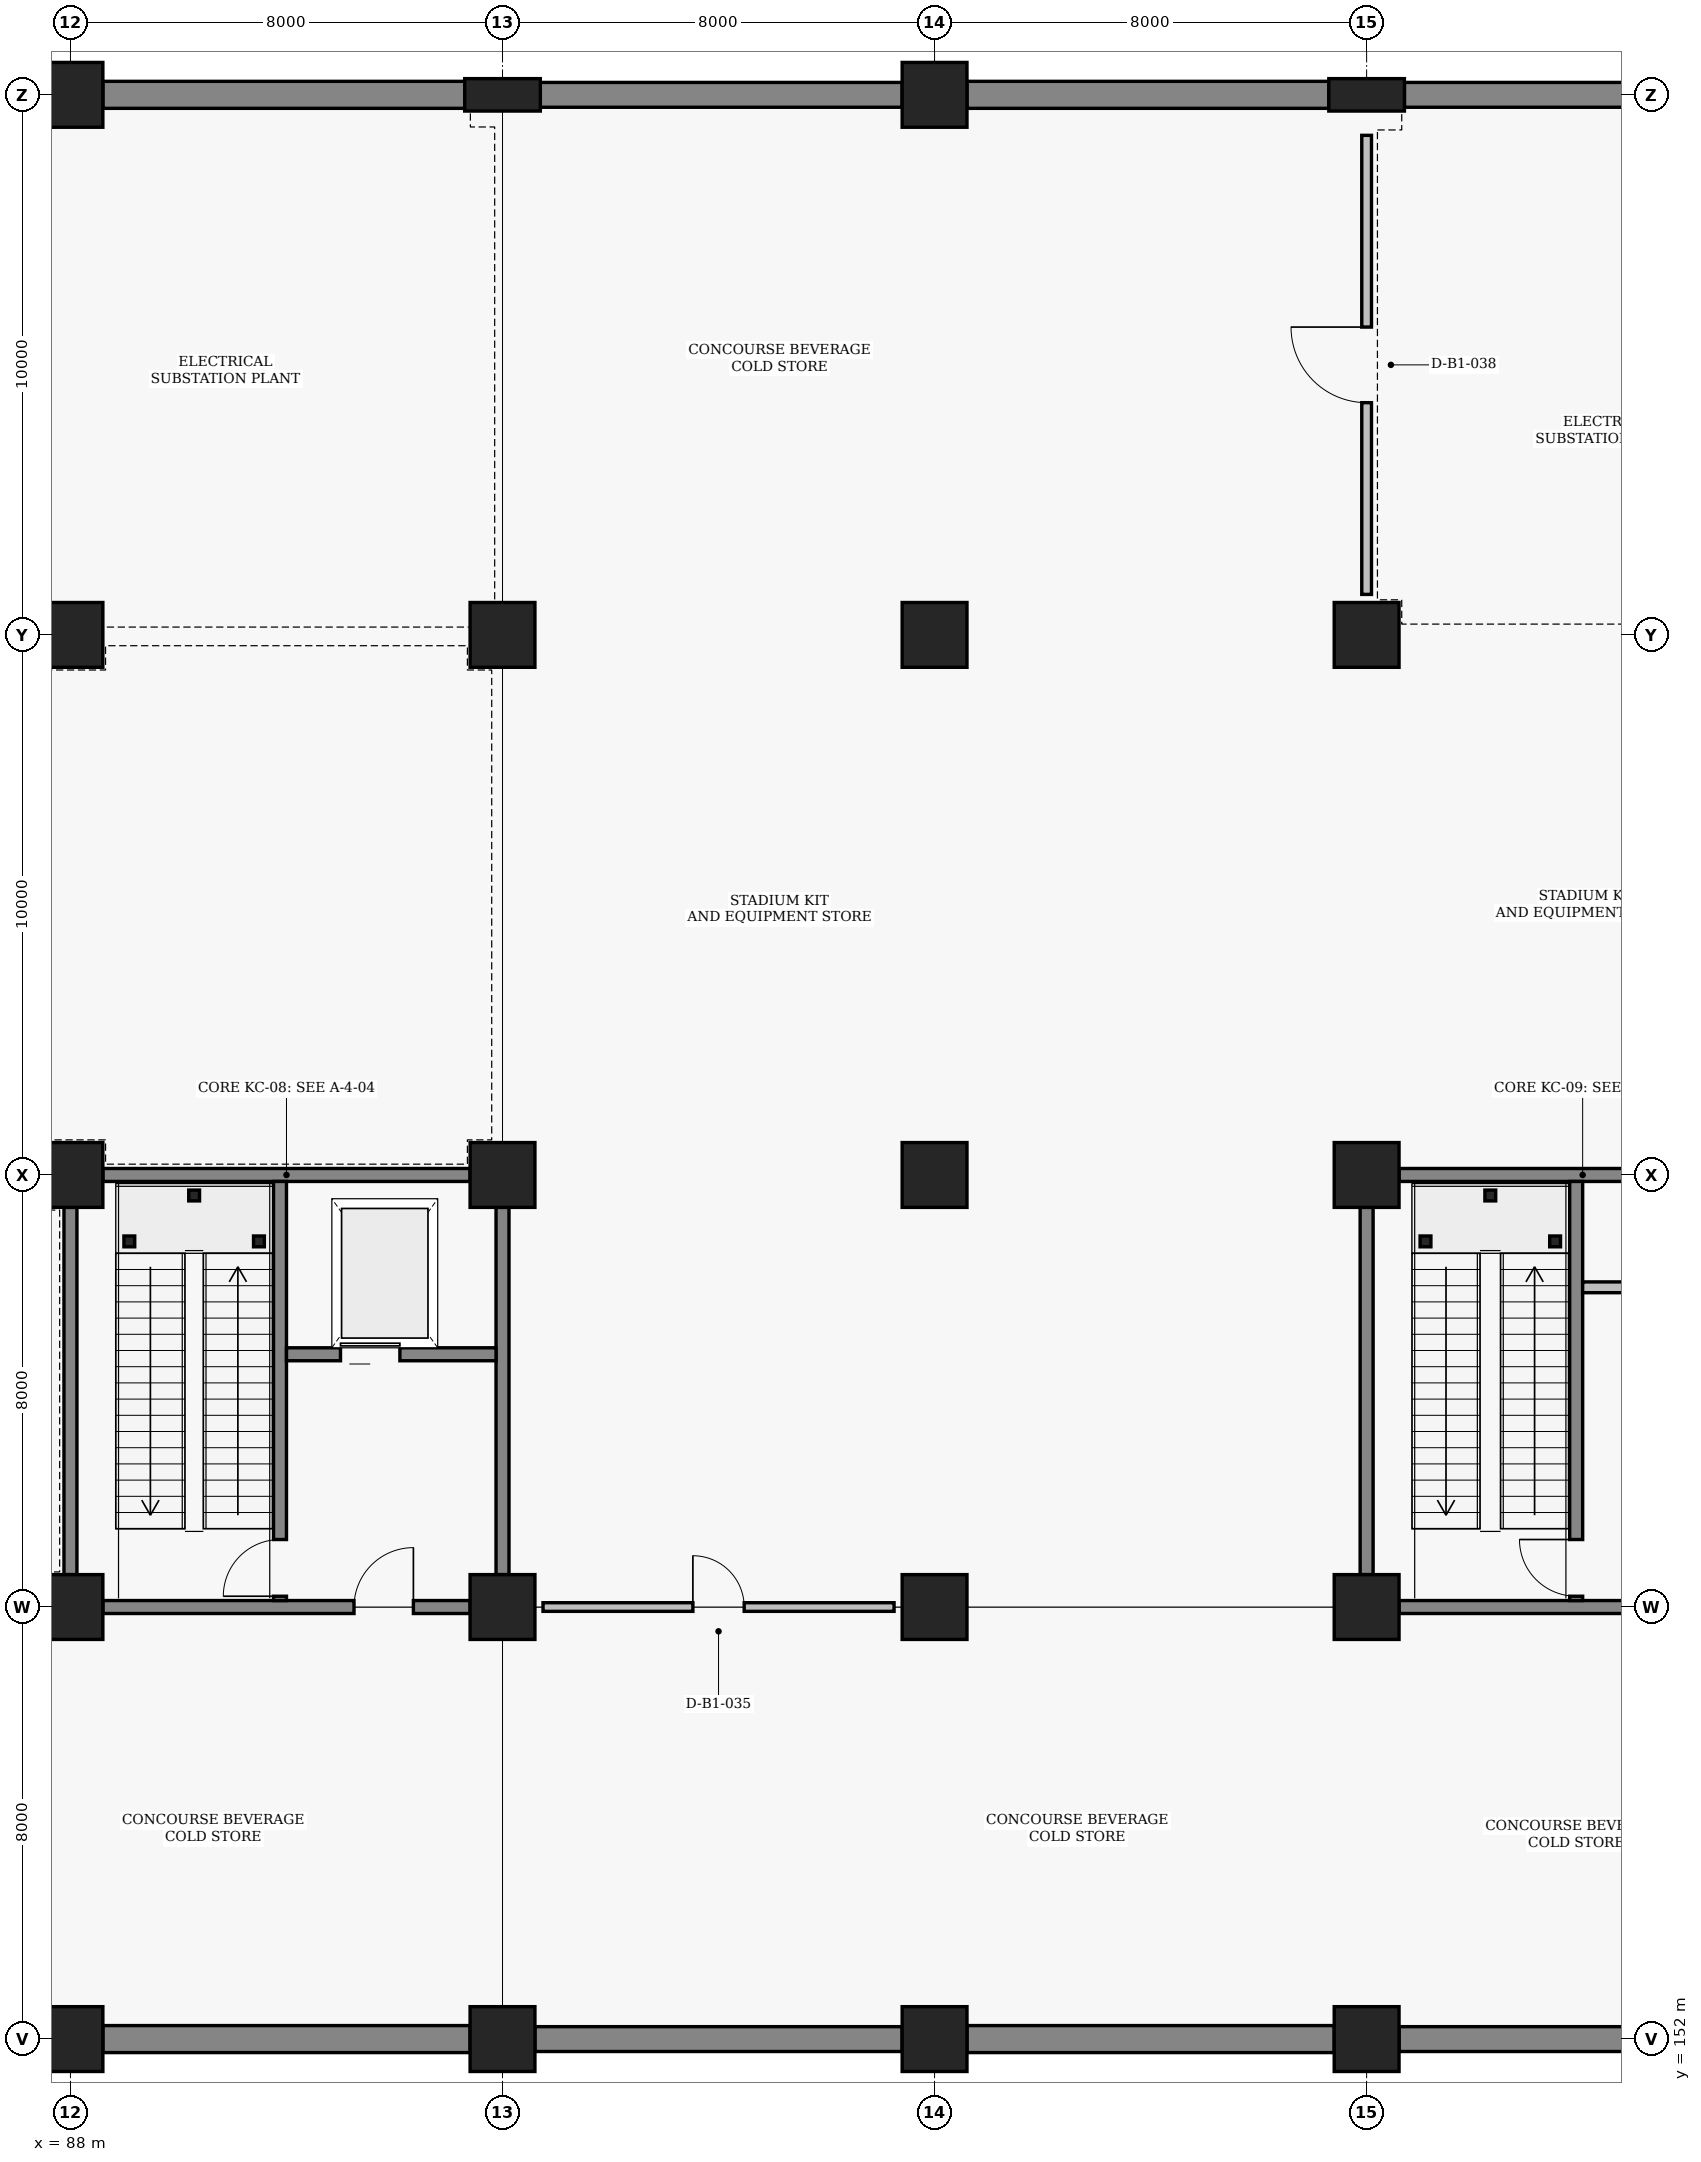
"""IFC4 building model, lengths in metres.
Left out: names, types, materials, properties, quantities, classifications, styles, units other than length and angle.
Written with IfcOpenShell. Run it as: python <this file> out.ifc"""

import sys

from ifc_helpers import new_model, si_unit, direction, frame, frame_2d, origin, origin_2d, place, context, subcontext, project, spatial, rectangle, hollow_rectangle, extrude, element, fill, save


model = new_model("IFC4")
c1 = context("Model", 3, precision=1e-05, world=origin(), true_north=direction((0.0, 1.0)))
c2 = subcontext(c1, "Body", "Model", "MODEL_VIEW")
j1 = project(units=[si_unit("LENGTHUNIT", "METRE"), si_unit("PLANEANGLEUNIT", "RADIAN")], contexts=[c1])
p1 = place(None, origin())
s1 = spatial("IfcSite", under=j1, at=p1, CompositionType="ELEMENT")
p2 = place(p1, origin())
s2 = spatial("IfcBuilding", under=s1, at=p2, CompositionType="ELEMENT")
p3 = place(p2, frame((0.0, 0.0, -5.4)))
s3 = spatial("IfcBuildingStorey", under=s2, at=p3, CompositionType="ELEMENT", Elevation=-5.4)
for number, where, z_axis, x_axis in (
    (1, (88.0, 152.0, 0.0), (0.0, 0.0, 1.0), (1.0, 0.0, 0.0)),
    (2, (88.0, 160.0, 0.0), (0.0, 0.0, 1.0), (1.0, 0.0, 0.0)),
    (3, (88.0, 168.0, 0.0), (0.0, 0.0, 1.0), (1.0, 0.0, 0.0)),
    (4, (88.0, 178.0, 0.0), (0.0, 0.0, 1.0), (1.0, 0.0, 0.0)),
    (5, (88.0, 188.0, 0.0), (0.0, 0.0, 1.0), (1.0, 0.0, 0.0)),
    (6, (96.0, 152.0, 0.0), (0.0, 0.0, 1.0), (1.0, 0.0, 0.0)),
    (7, (96.0, 160.0, 0.0), (0.0, 0.0, 1.0), (1.0, 0.0, 0.0)),
    (8, (96.0, 168.0, 0.0), (0.0, 0.0, 1.0), (1.0, 0.0, 0.0)),
    (9, (96.0, 178.0, 0.0), (0.0, 0.0, 1.0), (1.0, 0.0, 0.0)),
):
    element("IfcColumn", number, at=place(p3, frame(where, z_axis=z_axis, x_axis=x_axis)), inside=s3, PredefinedType="COLUMN", context=c2, shape_type="SweptSolid", body=[
        extrude(rectangle(XDim=1.2, YDim=1.2, at=origin_2d()), origin(), (0.0, 0.0, 1.0), 5.4),
    ])
p4 = place(p3, frame((96.0, 188.0, 0.0), z_axis=(0.0, 0.0, 1.0), x_axis=(0.0, 1.0, 0.0)))
e10 = element("IfcColumn", 10, at=p4, inside=s3, PredefinedType="PILASTER", context=c2, shape_type="SweptSolid", body=[
    extrude(rectangle(XDim=0.6, YDim=1.4, at=origin_2d()), origin(), (0.0, 0.0, 1.0), 5.4),
])
for number, where, z_axis, x_axis in (
    (11, (104.0, 152.0, 0.0), (0.0, 0.0, 1.0), (1.0, 0.0, 0.0)),
    (12, (104.0, 160.0, 0.0), (0.0, 0.0, 1.0), (1.0, 0.0, 0.0)),
    (13, (104.0, 168.0, 0.0), (0.0, 0.0, 1.0), (1.0, 0.0, 0.0)),
    (14, (104.0, 178.0, 0.0), (0.0, 0.0, 1.0), (1.0, 0.0, 0.0)),
    (15, (104.0, 188.0, 0.0), (0.0, 0.0, 1.0), (1.0, 0.0, 0.0)),
    (16, (112.0, 152.0, 0.0), (0.0, 0.0, 1.0), (1.0, 0.0, 0.0)),
    (17, (112.0, 160.0, 0.0), (0.0, 0.0, 1.0), (1.0, 0.0, 0.0)),
    (18, (112.0, 168.0, 0.0), (0.0, 0.0, 1.0), (1.0, 0.0, 0.0)),
    (19, (112.0, 178.0, 0.0), (0.0, 0.0, 1.0), (1.0, 0.0, 0.0)),
):
    element("IfcColumn", number, at=place(p3, frame(where, z_axis=z_axis, x_axis=x_axis)), inside=s3, PredefinedType="COLUMN", context=c2, shape_type="SweptSolid", body=[
        extrude(rectangle(XDim=1.2, YDim=1.2, at=origin_2d()), origin(), (0.0, 0.0, 1.0), 5.4),
    ])
p5 = place(p3, frame((112.0, 188.0, 0.0), z_axis=(0.0, 0.0, 1.0), x_axis=(0.0, 1.0, 0.0)))
e20 = element("IfcColumn", 20, at=p5, inside=s3, PredefinedType="PILASTER", context=c2, shape_type="SweptSolid", body=[
    extrude(rectangle(XDim=0.6, YDim=1.4, at=origin_2d()), origin(), (0.0, 0.0, 1.0), 5.4),
])
p6 = place(p3, frame((88.6, 152.0, 0.0), z_axis=(0.0, 0.0, 1.0), x_axis=(1.0, 0.0, 0.0)))
e21 = element("IfcWall", 21, at=p6, inside=s3, PredefinedType="STANDARD", context=c2, shape_type="SweptSolid", body=[
    extrude(rectangle(XDim=6.8, YDim=0.5, at=frame_2d((3.4, 0.0))), origin(), (0.0, 0.0, 1.0), 4.34),
])
p7 = place(p3, frame((88.6, 188.0, 0.0), z_axis=(0.0, 0.0, 1.0), x_axis=(1.0, 0.0, 0.0)))
e22 = element("IfcWall", 22, at=p7, inside=s3, PredefinedType="STANDARD", context=c2, shape_type="SweptSolid", body=[
    extrude(rectangle(XDim=6.7, YDim=0.5, at=frame_2d((3.35, 0.0))), origin(), (0.0, 0.0, 1.0), 4.34),
])
p8 = place(p3, frame((96.6, 152.0, 0.0), z_axis=(0.0, 0.0, 1.0), x_axis=(1.0, 0.0, 0.0)))
e23 = element("IfcWall", 23, at=p8, inside=s3, PredefinedType="STANDARD", context=c2, shape_type="SweptSolid", body=[
    extrude(rectangle(XDim=6.8, YDim=0.46, at=frame_2d((3.4, 0.0))), origin(), (0.0, 0.0, 1.0), 4.34),
])
p9 = place(p3, frame((96.7, 188.0, 0.0), z_axis=(0.0, 0.0, 1.0), x_axis=(1.0, 0.0, 0.0)))
e24 = element("IfcWall", 24, at=p9, inside=s3, PredefinedType="STANDARD", context=c2, shape_type="SweptSolid", body=[
    extrude(rectangle(XDim=6.7, YDim=0.46, at=frame_2d((3.35, 0.0))), origin(), (0.0, 0.0, 1.0), 4.34),
])
p10 = place(p3, frame((104.6, 152.0, 0.0), z_axis=(0.0, 0.0, 1.0), x_axis=(1.0, 0.0, 0.0)))
e25 = element("IfcWall", 25, at=p10, inside=s3, PredefinedType="STANDARD", context=c2, shape_type="SweptSolid", body=[
    extrude(rectangle(XDim=6.8, YDim=0.5, at=frame_2d((3.4, 0.0))), origin(), (0.0, 0.0, 1.0), 4.34),
])
p11 = place(p3, frame((104.6, 188.0, 0.0), z_axis=(0.0, 0.0, 1.0), x_axis=(1.0, 0.0, 0.0)))
e26 = element("IfcWall", 26, at=p11, inside=s3, PredefinedType="STANDARD", context=c2, shape_type="SweptSolid", body=[
    extrude(rectangle(XDim=6.7, YDim=0.5, at=frame_2d((3.35, 0.0))), origin(), (0.0, 0.0, 1.0), 4.34),
])
p12 = place(p3, frame((112.6, 152.0, 0.0), z_axis=(0.0, 0.0, 1.0), x_axis=(1.0, 0.0, 0.0)))
e27 = element("IfcWall", 27, at=p12, inside=s3, PredefinedType="STANDARD", context=c2, shape_type="SweptSolid", body=[
    extrude(rectangle(XDim=6.8, YDim=0.46, at=frame_2d((3.4, 0.0))), origin(), (0.0, 0.0, 1.0), 4.34),
])
p13 = place(p3, frame((112.7, 188.0, 0.0), z_axis=(0.0, 0.0, 1.0), x_axis=(1.0, 0.0, 0.0)))
e28 = element("IfcWall", 28, at=p13, inside=s3, PredefinedType="STANDARD", context=c2, shape_type="SweptSolid", body=[
    extrude(rectangle(XDim=6.7, YDim=0.46, at=frame_2d((3.35, 0.0))), origin(), (0.0, 0.0, 1.0), 4.34),
])
p14 = place(p3, frame((88.6, 160.0, 0.0), z_axis=(0.0, 0.0, 1.0), x_axis=(1.0, 0.0, 0.0)))
e29 = element("IfcWall", 29, at=p14, inside=s3, PredefinedType="SHEAR", context=c2, shape_type="SweptSolid", body=[
    extrude(rectangle(XDim=6.8, YDim=0.24, at=frame_2d((3.4, 0.0))), origin(), (0.0, 0.0, 1.0), 4.59),
])
p15 = place(p14, frame((4.65, 0.0, 0.0)))
e30 = element("IfcOpeningElement", 30, at=p15, cuts=e29, PredefinedType="OPENING", context=c2, shape_type="SweptSolid", body=[
    extrude(rectangle(XDim=1.1, YDim=2.2, at=frame_2d((0.55, 1.1))), frame((0.0, 0.13, 0.0), z_axis=(0.0, -1.0, 0.0), x_axis=(1.0, 0.0, 0.0)), (0.0, 0.0, 1.0), 0.26),
])
p16 = place(p3, frame((88.6, 168.0, 0.0), z_axis=(0.0, 0.0, 1.0), x_axis=(1.0, 0.0, 0.0)))
e31 = element("IfcWall", 31, at=p16, inside=s3, PredefinedType="SHEAR", context=c2, shape_type="SweptSolid", body=[
    extrude(rectangle(XDim=6.8, YDim=0.24, at=frame_2d((3.4, 0.0))), origin(), (0.0, 0.0, 1.0), 4.59),
])
for number, where, z_axis, x_axis in (
    (32, (88.0, 160.6, 0.0), (0.0, 0.0, 1.0), (0.0, 1.0, 0.0)),
    (33, (96.0, 160.6, 0.0), (0.0, 0.0, 1.0), (0.0, 1.0, 0.0)),
):
    element("IfcWall", number, at=place(p3, frame(where, z_axis=z_axis, x_axis=x_axis)), inside=s3, PredefinedType="SHEAR", context=c2, shape_type="SweptSolid", body=[
        extrude(rectangle(XDim=6.8, YDim=0.24, at=frame_2d((3.4, 0.0))), origin(), (0.0, 0.0, 1.0), 4.39),
    ])
p17 = place(p3, frame((91.88, 160.12, 0.0), z_axis=(0.0, 0.0, 1.0), x_axis=(0.0, 1.0, 0.0)))
e34 = element("IfcWall", 34, at=p17, inside=s3, PredefinedType="SHEAR", context=c2, shape_type="SweptSolid", body=[
    extrude(rectangle(XDim=7.76, YDim=0.24, at=frame_2d((3.88, 0.0))), origin(), (0.0, 0.0, 1.0), 4.59),
])
p18 = place(p17, frame((0.08, 0.0, 0.0)))
e35 = element("IfcOpeningElement", 35, at=p18, cuts=e34, PredefinedType="OPENING", context=c2, shape_type="SweptSolid", body=[
    extrude(rectangle(XDim=1.05, YDim=2.15, at=frame_2d((0.525, 1.075))), frame((0.0, 0.13, 0.0), z_axis=(0.0, -1.0, 0.0), x_axis=(1.0, 0.0, 0.0)), (0.0, 0.0, 1.0), 0.26),
])
p19 = place(p3, frame((92.0, 164.68, 0.0), z_axis=(0.0, 0.0, 1.0), x_axis=(1.0, 0.0, 0.0)))
e36 = element("IfcWall", 36, at=p19, inside=s3, PredefinedType="SHEAR", context=c2, shape_type="SweptSolid", body=[
    extrude(rectangle(XDim=3.88, YDim=0.24, at=frame_2d((1.94, 0.0))), origin(), (0.0, 0.0, 1.0), 4.39),
])
p20 = place(p19, frame((1.0, 0.0, 0.0)))
e37 = element("IfcOpeningElement", 37, at=p20, cuts=e36, PredefinedType="OPENING", context=c2, shape_type="SweptSolid", body=[
    extrude(rectangle(XDim=1.1, YDim=2.15, at=frame_2d((0.55, 1.075))), frame((0.0, 0.13, 0.0), z_axis=(0.0, -1.0, 0.0), x_axis=(1.0, 0.0, 0.0)), (0.0, 0.0, 1.0), 0.26),
])
for number, where, z_axis, x_axis in (
    (38, (89.09, 166.77, 0.0), (0.0, 0.0, 1.0), (1.0, 0.0, 0.0)),
    (39, (91.49, 166.77, 0.0), (0.0, 0.0, 1.0), (1.0, 0.0, 0.0)),
    (40, (90.29, 167.62, 0.0), (0.0, 0.0, 1.0), (1.0, 0.0, 0.0)),
):
    element("IfcColumn", number, at=place(p3, frame(where, z_axis=z_axis, x_axis=x_axis)), inside=s3, PredefinedType="COLUMN", context=c2, shape_type="SweptSolid", body=[
        extrude(hollow_rectangle(XDim=0.2, YDim=0.2, WallThickness=0.009, at=origin_2d()), origin(), (0.0, 0.0, 1.0), 2.5),
    ])
p21 = place(p3, frame((112.6, 160.0, 0.0), z_axis=(0.0, 0.0, 1.0), x_axis=(1.0, 0.0, 0.0)))
e41 = element("IfcWall", 41, at=p21, inside=s3, PredefinedType="SHEAR", context=c2, shape_type="SweptSolid", body=[
    extrude(rectangle(XDim=6.8, YDim=0.24, at=frame_2d((3.4, 0.0))), origin(), (0.0, 0.0, 1.0), 3.69),
])
p22 = place(p21, frame((4.65, 0.0, 0.0)))
e42 = element("IfcOpeningElement", 42, at=p22, cuts=e41, PredefinedType="OPENING", context=c2, shape_type="SweptSolid", body=[
    extrude(rectangle(XDim=1.1, YDim=2.2, at=frame_2d((0.55, 1.1))), frame((0.0, 0.13, 0.0), z_axis=(0.0, -1.0, 0.0), x_axis=(1.0, 0.0, 0.0)), (0.0, 0.0, 1.0), 0.26),
])
p23 = place(p3, frame((112.6, 168.0, 0.0), z_axis=(0.0, 0.0, 1.0), x_axis=(1.0, 0.0, 0.0)))
e43 = element("IfcWall", 43, at=p23, inside=s3, PredefinedType="SHEAR", context=c2, shape_type="SweptSolid", body=[
    extrude(rectangle(XDim=6.8, YDim=0.24, at=frame_2d((3.4, 0.0))), origin(), (0.0, 0.0, 1.0), 4.59),
])
p24 = place(p3, frame((112.0, 160.6, 0.0), z_axis=(0.0, 0.0, 1.0), x_axis=(0.0, 1.0, 0.0)))
e44 = element("IfcWall", 44, at=p24, inside=s3, PredefinedType="SHEAR", context=c2, shape_type="SweptSolid", body=[
    extrude(rectangle(XDim=6.8, YDim=0.24, at=frame_2d((3.4, 0.0))), origin(), (0.0, 0.0, 1.0), 4.39),
])
p25 = place(p3, frame((115.88, 160.12, 0.0), z_axis=(0.0, 0.0, 1.0), x_axis=(0.0, 1.0, 0.0)))
e45 = element("IfcWall", 45, at=p25, inside=s3, PredefinedType="SHEAR", context=c2, shape_type="SweptSolid", body=[
    extrude(rectangle(XDim=7.76, YDim=0.24, at=frame_2d((3.88, 0.0))), origin(), (0.0, 0.0, 1.0), 4.59),
])
p26 = place(p25, frame((0.08, 0.0, 0.0)))
e46 = element("IfcOpeningElement", 46, at=p26, cuts=e45, PredefinedType="OPENING", context=c2, shape_type="SweptSolid", body=[
    extrude(rectangle(XDim=1.05, YDim=2.15, at=frame_2d((0.525, 1.075))), frame((0.0, 0.13, 0.0), z_axis=(0.0, -1.0, 0.0), x_axis=(1.0, 0.0, 0.0)), (0.0, 0.0, 1.0), 0.26),
])
p27 = place(p3, frame((116.0, 165.92, 0.0), z_axis=(0.0, 0.0, 1.0), x_axis=(1.0, 0.0, 0.0)))
e47 = element("IfcWall", 47, at=p27, inside=s3, PredefinedType="PARTITIONING", context=c2, shape_type="SweptSolid", body=[
    extrude(rectangle(XDim=3.88, YDim=0.2, at=frame_2d((1.94, 0.0))), origin(), (0.0, 0.0, 1.0), 4.39),
])
p28 = place(p27, frame((1.25, 0.0, 0.0)))
e48 = element("IfcOpeningElement", 48, at=p28, cuts=e47, PredefinedType="OPENING", context=c2, shape_type="SweptSolid", body=[
    extrude(rectangle(XDim=0.85, YDim=2.05, at=frame_2d((0.425, 1.025))), frame((0.0, 0.11, 0.0), z_axis=(0.0, -1.0, 0.0), x_axis=(1.0, 0.0, 0.0)), (0.0, 0.0, 1.0), 0.22),
])
for number, where, z_axis, x_axis in (
    (49, (113.09, 166.77, 0.0), (0.0, 0.0, 1.0), (1.0, 0.0, 0.0)),
    (50, (115.49, 166.77, 0.0), (0.0, 0.0, 1.0), (1.0, 0.0, 0.0)),
    (51, (114.29, 167.62, 0.0), (0.0, 0.0, 1.0), (1.0, 0.0, 0.0)),
):
    element("IfcColumn", number, at=place(p3, frame(where, z_axis=z_axis, x_axis=x_axis)), inside=s3, PredefinedType="COLUMN", context=c2, shape_type="SweptSolid", body=[
        extrude(hollow_rectangle(XDim=0.2, YDim=0.2, WallThickness=0.009, at=origin_2d()), origin(), (0.0, 0.0, 1.0), 2.5),
    ])
p29 = place(p3, frame((96.75, 160.0, 0.0), z_axis=(0.0, 0.0, 1.0), x_axis=(1.0, 0.0, 0.0)))
e52 = element("IfcWall", 52, at=p29, inside=s3, PredefinedType="PARTITIONING", context=c2, shape_type="SweptSolid", body=[
    extrude(rectangle(XDim=6.5, YDim=0.16, at=frame_2d((3.25, 0.0))), origin(), (0.0, 0.0, 1.0), 4.49),
])
p30 = place(p29, frame((2.775, 0.0, 0.0)))
e53 = element("IfcOpeningElement", 53, at=p30, cuts=e52, PredefinedType="OPENING", context=c2, shape_type="SweptSolid", body=[
    extrude(rectangle(XDim=0.95, YDim=2.1, at=frame_2d((0.475, 1.05))), frame((0.0, 0.09, 0.0), z_axis=(0.0, -1.0, 0.0), x_axis=(1.0, 0.0, 0.0)), (0.0, 0.0, 1.0), 0.18),
])
p31 = place(p3, frame((112.0, 178.75, 0.0), z_axis=(0.0, 0.0, 1.0), x_axis=(0.0, 1.0, 0.0)))
e54 = element("IfcWall", 54, at=p31, inside=s3, PredefinedType="PARTITIONING", context=c2, shape_type="SweptSolid", body=[
    extrude(rectangle(XDim=8.5, YDim=0.18, at=frame_2d((4.25, 0.0))), origin(), (0.0, 0.0, 1.0), 3.69),
])
p32 = place(p31, frame((3.55, 0.0, 0.0)))
e55 = element("IfcOpeningElement", 55, at=p32, cuts=e54, PredefinedType="OPENING", context=c2, shape_type="SweptSolid", body=[
    extrude(rectangle(XDim=1.4, YDim=2.2, at=frame_2d((0.7, 1.1))), frame((0.0, 0.1, 0.0), z_axis=(0.0, -1.0, 0.0), x_axis=(1.0, 0.0, 0.0)), (0.0, 0.0, 1.0), 0.2),
])
p33 = place(p15, origin())
e56 = element("IfcDoor", 56, at=p33, inside=s3, OperationType="SINGLE_SWING_RIGHT", PredefinedType="DOOR", context=c2, shape_type="SweptSolid", body=[
    extrude(rectangle(XDim=1.1, YDim=2.2, at=frame_2d((0.55, 1.1))), frame((0.0, 0.025, 0.0), z_axis=(0.0, -1.0, 0.0), x_axis=(1.0, 0.0, 0.0)), (0.0, 0.0, 1.0), 0.05),
])
fill(e30, e56)
p34 = place(p18, origin())
e57 = element("IfcDoor", 57, at=p34, inside=s3, OperationType="SINGLE_SWING_LEFT", PredefinedType="DOOR", context=c2, shape_type="SweptSolid", body=[
    extrude(rectangle(XDim=1.05, YDim=2.15, at=frame_2d((0.525, 1.075))), frame((0.0, 0.025, 0.0), z_axis=(0.0, -1.0, 0.0), x_axis=(1.0, 0.0, 0.0)), (0.0, 0.0, 1.0), 0.05),
])
fill(e35, e57)
p35 = place(p20, origin())
e58 = element("IfcDoor", 58, at=p35, inside=s3, OperationType="SLIDING_TO_LEFT", PredefinedType="DOOR", context=c2, shape_type="SweptSolid", body=[
    extrude(rectangle(XDim=1.1, YDim=2.15, at=frame_2d((0.55, 1.075))), frame((0.0, 0.025, 0.0), z_axis=(0.0, -1.0, 0.0), x_axis=(1.0, 0.0, 0.0)), (0.0, 0.0, 1.0), 0.05),
])
fill(e37, e58)
p36 = place(p26, origin())
e59 = element("IfcDoor", 59, at=p36, inside=s3, OperationType="SINGLE_SWING_RIGHT", PredefinedType="DOOR", context=c2, shape_type="SweptSolid", body=[
    extrude(rectangle(XDim=1.05, YDim=2.15, at=frame_2d((0.525, 1.075))), frame((0.0, 0.025, 0.0), z_axis=(0.0, -1.0, 0.0), x_axis=(1.0, 0.0, 0.0)), (0.0, 0.0, 1.0), 0.05),
])
fill(e46, e59)
p37 = place(p30, origin())
e60 = element("IfcDoor", 60, at=p37, inside=s3, OperationType="SINGLE_SWING_LEFT", PredefinedType="DOOR", context=c2, shape_type="SweptSolid", body=[
    extrude(rectangle(XDim=0.95, YDim=2.1, at=frame_2d((0.475, 1.05))), frame((0.0, 0.025, 0.0), z_axis=(0.0, -1.0, 0.0), x_axis=(1.0, 0.0, 0.0)), (0.0, 0.0, 1.0), 0.05),
])
fill(e53, e60)
p38 = place(p32, origin())
e61 = element("IfcDoor", 61, at=p38, inside=s3, OperationType="SINGLE_SWING_RIGHT", PredefinedType="DOOR", context=c2, shape_type="SweptSolid", body=[
    extrude(rectangle(XDim=1.4, YDim=2.2, at=frame_2d((0.7, 1.1))), frame((0.0, 0.025, 0.0), z_axis=(0.0, -1.0, 0.0), x_axis=(1.0, 0.0, 0.0)), (0.0, 0.0, 1.0), 0.05),
])
fill(e55, e61)
save(model, sys.argv[1])
